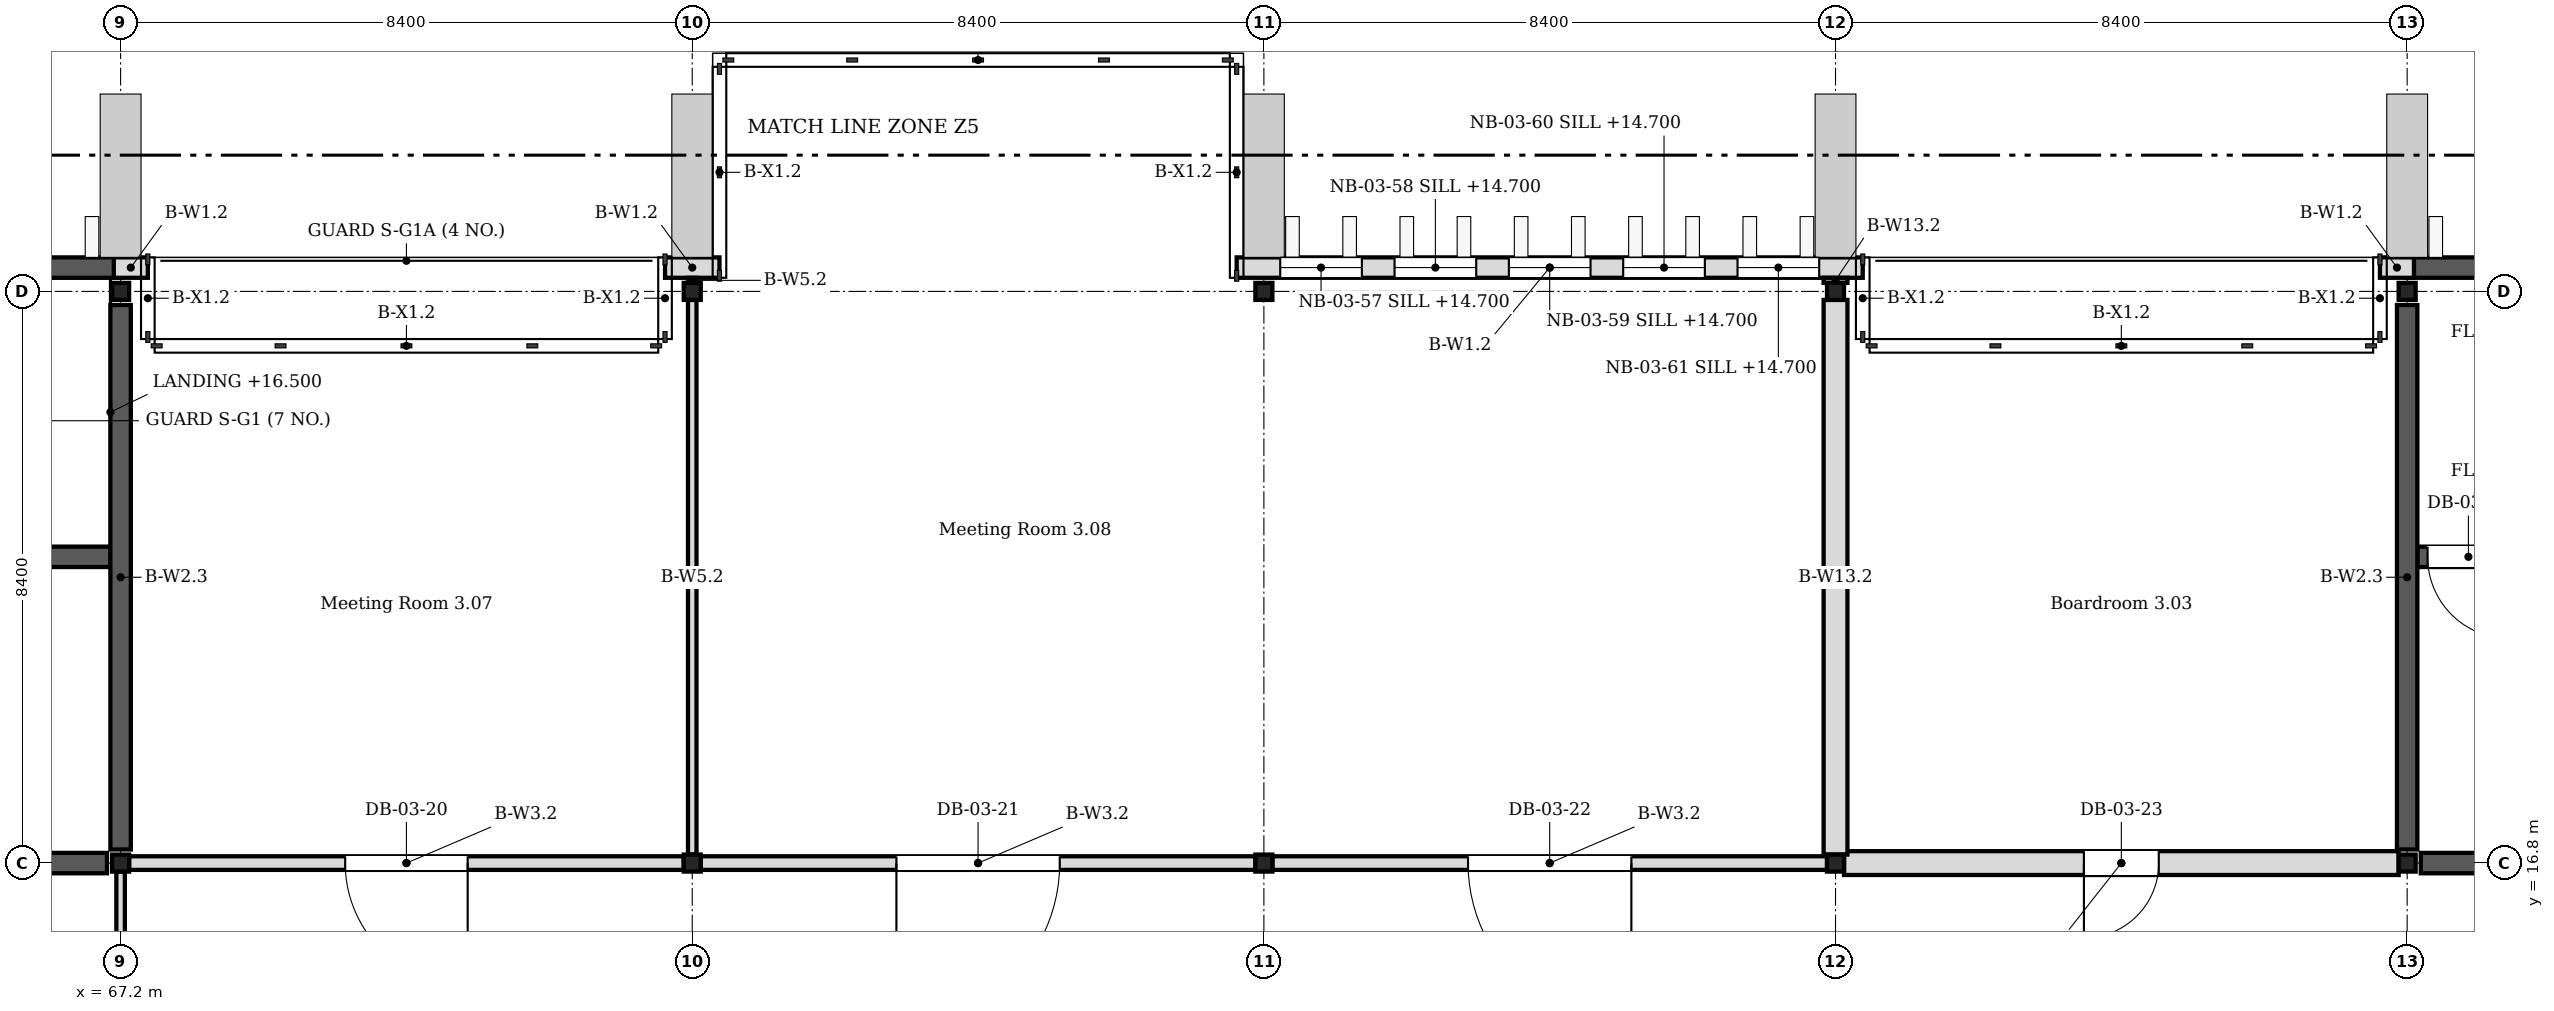
"""IFC4 building model, lengths in metres.
Left out: names, types, materials, properties, quantities, classifications, styles, units other than length and angle.
Written with IfcOpenShell. Run it as: python <this file> out.ifc"""

import sys

from ifc_helpers import new_model, si_unit, direction, frame, frame_2d, origin, origin_2d, place, context, subcontext, project, spatial, rectangle, i_section, extrude, element, fill, save


model = new_model("IFC4")
c1 = context("Model", 3, precision=1e-05, world=origin(), true_north=direction((0.0, 1.0)))
c2 = subcontext(c1, "Body", "Model", "MODEL_VIEW")
j1 = project(units=[si_unit("LENGTHUNIT", "METRE"), si_unit("PLANEANGLEUNIT", "RADIAN")], contexts=[c1])
p1 = place(None, origin())
s1 = spatial("IfcSite", under=j1, at=p1, CompositionType="ELEMENT")
p2 = place(p1, origin())
s2 = spatial("IfcBuilding", under=s1, at=p2, CompositionType="ELEMENT")
p3 = place(p2, frame((0.0, 0.0, 14.4)))
s3 = spatial("IfcBuildingStorey", under=s2, at=p3, CompositionType="ELEMENT", Elevation=14.4)
for number, where, z_axis, x_axis in (
    (1, (67.2, 16.8, 0.0), (0.0, 0.0, 1.0), (1.0, 0.0, 0.0)),
    (2, (67.2, 25.2, 0.0), (0.0, 0.0, 1.0), (1.0, 0.0, 0.0)),
    (3, (75.6, 16.8, 0.0), (0.0, 0.0, 1.0), (1.0, 0.0, 0.0)),
    (4, (75.6, 25.2, 0.0), (0.0, 0.0, 1.0), (1.0, 0.0, 0.0)),
    (5, (84.0, 16.8, 0.0), (0.0, 0.0, 1.0), (1.0, 0.0, 0.0)),
    (6, (84.0, 25.2, 0.0), (0.0, 0.0, 1.0), (1.0, 0.0, 0.0)),
    (7, (92.4, 16.8, 0.0), (0.0, 0.0, 1.0), (1.0, 0.0, 0.0)),
    (8, (92.4, 25.2, 0.0), (0.0, 0.0, 1.0), (1.0, 0.0, 0.0)),
    (9, (100.8, 16.8, 0.0), (0.0, 0.0, 1.0), (1.0, 0.0, 0.0)),
    (10, (100.8, 25.2, 0.0), (0.0, 0.0, 1.0), (1.0, 0.0, 0.0)),
):
    element("IfcColumn", number, at=place(p3, frame(where, z_axis=z_axis, x_axis=x_axis)), inside=s3, PredefinedType="COLUMN", context=c2, shape_type="SweptSolid", body=[
        extrude(i_section(OverallWidth=0.25, OverallDepth=0.25, WebThickness=0.009, FlangeThickness=0.014, FilletRadius=0.013, at=origin_2d()), origin(), (0.0, 0.0, 1.0), 3.95),
    ])
p4 = place(p3, frame((67.2, 17.0, 0.0), z_axis=(0.0, 0.0, 1.0), x_axis=(0.0, 1.0, 0.0)))
e11 = element("IfcWall", 11, at=p4, inside=s3, PredefinedType="SHEAR", context=c2, shape_type="SweptSolid", body=[
    extrude(rectangle(XDim=8.0, YDim=0.3, at=frame_2d((4.0, 0.0))), origin(), (0.0, 0.0, 1.0), 3.95),
])
p5 = place(p3, frame((59.0, 16.8, 0.0), z_axis=(0.0, 0.0, 1.0), x_axis=(1.0, 0.0, 0.0)))
e12 = element("IfcWall", 12, at=p5, inside=s3, PredefinedType="SHEAR", context=c2, shape_type="SweptSolid", body=[
    extrude(rectangle(XDim=8.0, YDim=0.3, at=frame_2d((4.0, 0.0))), origin(), (0.0, 0.0, 1.0), 3.95),
])
p6 = place(p5, frame((3.1, 0.0, 0.0)))
e13 = element("IfcOpeningElement", 13, at=p6, cuts=e12, PredefinedType="OPENING", context=c2, shape_type="SweptSolid", body=[
    extrude(rectangle(XDim=1.8, YDim=2.1, at=frame_2d((0.9, 1.05))), frame((0.0, 0.16, 0.0), z_axis=(0.0, -1.0, 0.0), x_axis=(1.0, 0.0, 0.0)), (0.0, 0.0, 1.0), 0.32),
])
p7 = place(p3, frame((58.95, 21.3, 0.0), z_axis=(0.0, 0.0, 1.0), x_axis=(1.0, 0.0, 0.0)))
e14 = element("IfcWall", 14, at=p7, inside=s3, PredefinedType="SHEAR", context=c2, shape_type="SweptSolid", body=[
    extrude(rectangle(XDim=8.1, YDim=0.3, at=frame_2d((4.05, 0.0))), origin(), (0.0, 0.0, 1.0), 3.95),
])
p8 = place(p7, frame((0.15, 0.0, 0.0)))
e15 = element("IfcOpeningElement", 15, at=p8, cuts=e14, PredefinedType="OPENING", context=c2, shape_type="SweptSolid", body=[
    extrude(rectangle(XDim=1.2, YDim=2.1, at=frame_2d((0.6, 1.05))), frame((0.0, 0.16, 0.0), z_axis=(0.0, -1.0, 0.0), x_axis=(1.0, 0.0, 0.0)), (0.0, 0.0, 1.0), 0.32),
])
p9 = place(p3, frame((58.8, 25.55, 0.0), z_axis=(0.0, 0.0, 1.0), x_axis=(1.0, 0.0, 0.0)))
e16 = element("IfcWall", 16, at=p9, inside=s3, PredefinedType="SHEAR", context=c2, shape_type="SweptSolid", body=[
    extrude(rectangle(XDim=8.4, YDim=0.3, at=frame_2d((4.2, 0.0))), origin(), (0.0, 0.0, 1.0), 3.95),
])
p10 = place(p3, frame((100.8, 17.0, 0.0), z_axis=(0.0, 0.0, 1.0), x_axis=(0.0, 1.0, 0.0)))
e17 = element("IfcWall", 17, at=p10, inside=s3, PredefinedType="SHEAR", context=c2, shape_type="SweptSolid", body=[
    extrude(rectangle(XDim=8.0, YDim=0.3, at=frame_2d((4.0, 0.0))), origin(), (0.0, 0.0, 1.0), 3.95),
])
p11 = place(p3, frame((101.0, 16.8, 0.0), z_axis=(0.0, 0.0, 1.0), x_axis=(1.0, 0.0, 0.0)))
e18 = element("IfcWall", 18, at=p11, inside=s3, PredefinedType="SHEAR", context=c2, shape_type="SweptSolid", body=[
    extrude(rectangle(XDim=8.0, YDim=0.3, at=frame_2d((4.0, 0.0))), origin(), (0.0, 0.0, 1.0), 3.95),
])
p12 = place(p11, frame((3.1, 0.0, 0.0)))
e19 = element("IfcOpeningElement", 19, at=p12, cuts=e18, PredefinedType="OPENING", context=c2, shape_type="SweptSolid", body=[
    extrude(rectangle(XDim=1.8, YDim=2.1, at=frame_2d((0.9, 1.05))), frame((0.0, 0.16, 0.0), z_axis=(0.0, -1.0, 0.0), x_axis=(1.0, 0.0, 0.0)), (0.0, 0.0, 1.0), 0.32),
])
p13 = place(p3, frame((100.95, 21.3, 0.0), z_axis=(0.0, 0.0, 1.0), x_axis=(1.0, 0.0, 0.0)))
e20 = element("IfcWall", 20, at=p13, inside=s3, PredefinedType="SHEAR", context=c2, shape_type="SweptSolid", body=[
    extrude(rectangle(XDim=8.1, YDim=0.3, at=frame_2d((4.05, 0.0))), origin(), (0.0, 0.0, 1.0), 3.95),
])
p14 = place(p13, frame((0.15, 0.0, 0.0)))
e21 = element("IfcOpeningElement", 21, at=p14, cuts=e20, PredefinedType="OPENING", context=c2, shape_type="SweptSolid", body=[
    extrude(rectangle(XDim=1.2, YDim=2.1, at=frame_2d((0.6, 1.05))), frame((0.0, 0.16, 0.0), z_axis=(0.0, -1.0, 0.0), x_axis=(1.0, 0.0, 0.0)), (0.0, 0.0, 1.0), 0.32),
])
p15 = place(p3, frame((100.8, 25.55, 0.0), z_axis=(0.0, 0.0, 1.0), x_axis=(1.0, 0.0, 0.0)))
e22 = element("IfcWall", 22, at=p15, inside=s3, PredefinedType="SHEAR", context=c2, shape_type="SweptSolid", body=[
    extrude(rectangle(XDim=8.4, YDim=0.3, at=frame_2d((4.2, 0.0))), origin(), (0.0, 0.0, 1.0), 3.95),
])
p16 = place(p3, frame((67.1, 25.55, 0.0), z_axis=(0.0, 0.0, 1.0), x_axis=(1.0, 0.0, 0.0)))
e23 = element("IfcWall", 23, at=p16, inside=s3, PredefinedType="SOLIDWALL", context=c2, shape_type="SweptSolid", body=[
    extrude(rectangle(XDim=0.5, YDim=0.3, at=frame_2d((0.25, 0.0))), origin(), (0.0, 0.0, 1.0), 3.95),
])
p17 = place(p3, frame((75.2, 25.55, 0.0), z_axis=(0.0, 0.0, 1.0), x_axis=(1.0, 0.0, 0.0)))
e24 = element("IfcWall", 24, at=p17, inside=s3, PredefinedType="SOLIDWALL", context=c2, shape_type="SweptSolid", body=[
    extrude(rectangle(XDim=0.8, YDim=0.3, at=frame_2d((0.4, 0.0))), origin(), (0.0, 0.0, 1.0), 3.95),
])
p18 = place(p3, frame((83.6, 25.55, 0.0), z_axis=(0.0, 0.0, 1.0), x_axis=(1.0, 0.0, 0.0)))
e25 = element("IfcWall", 25, at=p18, inside=s3, PredefinedType="SOLIDWALL", context=c2, shape_type="SweptSolid", body=[
    extrude(rectangle(XDim=9.2, YDim=0.3, at=frame_2d((4.6, 0.0))), origin(), (0.0, 0.0, 1.0), 3.95),
])
p19 = place(p18, frame((0.64, 0.0, 0.3)))
e26 = element("IfcOpeningElement", 26, at=p19, cuts=e25, PredefinedType="OPENING", context=c2, shape_type="SweptSolid", body=[
    extrude(rectangle(XDim=1.2, YDim=3.3, at=frame_2d((0.6, 1.65))), frame((0.0, 0.16, 0.0), z_axis=(0.0, -1.0, 0.0), x_axis=(1.0, 0.0, 0.0)), (0.0, 0.0, 1.0), 0.32),
])
p20 = place(p18, frame((2.32, 0.0, 0.3)))
e27 = element("IfcOpeningElement", 27, at=p20, cuts=e25, PredefinedType="OPENING", context=c2, shape_type="SweptSolid", body=[
    extrude(rectangle(XDim=1.2, YDim=3.3, at=frame_2d((0.6, 1.65))), frame((0.0, 0.16, 0.0), z_axis=(0.0, -1.0, 0.0), x_axis=(1.0, 0.0, 0.0)), (0.0, 0.0, 1.0), 0.32),
])
p21 = place(p18, frame((4.0, 0.0, 0.3)))
e28 = element("IfcOpeningElement", 28, at=p21, cuts=e25, PredefinedType="OPENING", context=c2, shape_type="SweptSolid", body=[
    extrude(rectangle(XDim=1.2, YDim=3.3, at=frame_2d((0.6, 1.65))), frame((0.0, 0.16, 0.0), z_axis=(0.0, -1.0, 0.0), x_axis=(1.0, 0.0, 0.0)), (0.0, 0.0, 1.0), 0.32),
])
p22 = place(p18, frame((5.68, 0.0, 0.3)))
e29 = element("IfcOpeningElement", 29, at=p22, cuts=e25, PredefinedType="OPENING", context=c2, shape_type="SweptSolid", body=[
    extrude(rectangle(XDim=1.2, YDim=3.3, at=frame_2d((0.6, 1.65))), frame((0.0, 0.16, 0.0), z_axis=(0.0, -1.0, 0.0), x_axis=(1.0, 0.0, 0.0)), (0.0, 0.0, 1.0), 0.32),
])
p23 = place(p18, frame((7.36, 0.0, 0.3)))
e30 = element("IfcOpeningElement", 30, at=p23, cuts=e25, PredefinedType="OPENING", context=c2, shape_type="SweptSolid", body=[
    extrude(rectangle(XDim=1.2, YDim=3.3, at=frame_2d((0.6, 1.65))), frame((0.0, 0.16, 0.0), z_axis=(0.0, -1.0, 0.0), x_axis=(1.0, 0.0, 0.0)), (0.0, 0.0, 1.0), 0.32),
])
p24 = place(p3, frame((100.4, 25.55, 0.0), z_axis=(0.0, 0.0, 1.0), x_axis=(1.0, 0.0, 0.0)))
e31 = element("IfcWall", 31, at=p24, inside=s3, PredefinedType="SOLIDWALL", context=c2, shape_type="SweptSolid", body=[
    extrude(rectangle(XDim=0.5, YDim=0.3, at=frame_2d((0.25, 0.0))), origin(), (0.0, 0.0, 1.0), 3.95),
])
p25 = place(p3, frame((67.325, 16.8, 0.0), z_axis=(0.0, 0.0, 1.0), x_axis=(1.0, 0.0, 0.0)))
e32 = element("IfcWall", 32, at=p25, inside=s3, PredefinedType="PARTITIONING", context=c2, shape_type="SweptSolid", body=[
    extrude(rectangle(XDim=8.15, YDim=0.2, at=frame_2d((4.075, 0.0))), origin(), (0.0, 0.0, 1.0), 3.25),
])
p26 = place(p25, frame((3.175, 0.0, 0.0)))
e33 = element("IfcOpeningElement", 33, at=p26, cuts=e32, PredefinedType="OPENING", context=c2, shape_type="SweptSolid", body=[
    extrude(rectangle(XDim=1.8, YDim=2.1, at=frame_2d((0.9, 1.05))), frame((0.0, 0.11, 0.0), z_axis=(0.0, -1.0, 0.0), x_axis=(1.0, 0.0, 0.0)), (0.0, 0.0, 1.0), 0.22),
])
p27 = place(p3, frame((75.725, 16.8, 0.0), z_axis=(0.0, 0.0, 1.0), x_axis=(1.0, 0.0, 0.0)))
e34 = element("IfcWall", 34, at=p27, inside=s3, PredefinedType="PARTITIONING", context=c2, shape_type="SweptSolid", body=[
    extrude(rectangle(XDim=8.15, YDim=0.2, at=frame_2d((4.075, 0.0))), origin(), (0.0, 0.0, 1.0), 3.25),
])
p28 = place(p27, frame((2.875, 0.0, 0.0)))
e35 = element("IfcOpeningElement", 35, at=p28, cuts=e34, PredefinedType="OPENING", context=c2, shape_type="SweptSolid", body=[
    extrude(rectangle(XDim=2.4, YDim=2.2, at=frame_2d((1.2, 1.1))), frame((0.0, 0.11, 0.0), z_axis=(0.0, -1.0, 0.0), x_axis=(1.0, 0.0, 0.0)), (0.0, 0.0, 1.0), 0.22),
])
p29 = place(p3, frame((84.125, 16.8, 0.0), z_axis=(0.0, 0.0, 1.0), x_axis=(1.0, 0.0, 0.0)))
e36 = element("IfcWall", 36, at=p29, inside=s3, PredefinedType="PARTITIONING", context=c2, shape_type="SweptSolid", body=[
    extrude(rectangle(XDim=8.15, YDim=0.2, at=frame_2d((4.075, 0.0))), origin(), (0.0, 0.0, 1.0), 3.25),
])
p30 = place(p29, frame((2.875, 0.0, 0.0)))
e37 = element("IfcOpeningElement", 37, at=p30, cuts=e36, PredefinedType="OPENING", context=c2, shape_type="SweptSolid", body=[
    extrude(rectangle(XDim=2.4, YDim=2.2, at=frame_2d((1.2, 1.1))), frame((0.0, 0.11, 0.0), z_axis=(0.0, -1.0, 0.0), x_axis=(1.0, 0.0, 0.0)), (0.0, 0.0, 1.0), 0.22),
])
p31 = place(p3, frame((92.525, 16.8, 0.0), z_axis=(0.0, 0.0, 1.0), x_axis=(1.0, 0.0, 0.0)))
e38 = element("IfcWall", 38, at=p31, inside=s3, PredefinedType="PARTITIONING", context=c2, shape_type="SweptSolid", body=[
    extrude(rectangle(XDim=8.15, YDim=0.35, at=frame_2d((4.075, 0.0))), origin(), (0.0, 0.0, 1.0), 3.25),
])
p32 = place(p31, frame((3.525, 0.0, 0.0)))
e39 = element("IfcOpeningElement", 39, at=p32, cuts=e38, PredefinedType="OPENING", context=c2, shape_type="SweptSolid", body=[
    extrude(rectangle(XDim=1.1, YDim=2.4, at=frame_2d((0.55, 1.2))), frame((0.0, 0.185, 0.0), z_axis=(0.0, -1.0, 0.0), x_axis=(1.0, 0.0, 0.0)), (0.0, 0.0, 1.0), 0.37),
])
p33 = place(p3, frame((67.2, 8.525, 0.0), z_axis=(0.0, 0.0, 1.0), x_axis=(0.0, 1.0, 0.0)))
e40 = element("IfcWall", 40, at=p33, inside=s3, PredefinedType="PARTITIONING", context=c2, shape_type="SweptSolid", body=[
    extrude(rectangle(XDim=8.15, YDim=0.125, at=frame_2d((4.075, 0.0))), origin(), (0.0, 0.0, 1.0), 3.25),
])
p34 = place(p33, frame((2.875, 0.0, 0.0)))
e41 = element("IfcOpeningElement", 41, at=p34, cuts=e40, PredefinedType="OPENING", context=c2, shape_type="SweptSolid", body=[
    extrude(rectangle(XDim=2.4, YDim=2.2, at=frame_2d((1.2, 1.1))), frame((0.0, 0.073, 0.0), z_axis=(0.0, -1.0, 0.0), x_axis=(1.0, 0.0, 0.0)), (0.0, 0.0, 1.0), 0.145),
])
p35 = place(p3, frame((75.6, 16.925, 0.0), z_axis=(0.0, 0.0, 1.0), x_axis=(0.0, 1.0, 0.0)))
e42 = element("IfcWall", 42, at=p35, inside=s3, PredefinedType="MOVABLE", context=c2, shape_type="SweptSolid", body=[
    extrude(rectangle(XDim=8.15, YDim=0.125, at=frame_2d((4.075, 0.0))), origin(), (0.0, 0.0, 1.0), 3.25),
])
p36 = place(p3, frame((75.6, 25.325, 0.0), z_axis=(0.0, 0.0, 1.0), x_axis=(0.0, 1.0, 0.0)))
e43 = element("IfcWall", 43, at=p36, inside=s3, PredefinedType="MOVABLE", context=c2, shape_type="SweptSolid", body=[
    extrude(rectangle(XDim=0.075, YDim=0.125, at=frame_2d((0.038, 0.0))), origin(), (0.0, 0.0, 1.0), 3.25),
])
p37 = place(p3, frame((92.4, 16.925, 0.0), z_axis=(0.0, 0.0, 1.0), x_axis=(0.0, 1.0, 0.0)))
e44 = element("IfcWall", 44, at=p37, inside=s3, PredefinedType="PARTITIONING", context=c2, shape_type="SweptSolid", body=[
    extrude(rectangle(XDim=8.15, YDim=0.35, at=frame_2d((4.075, 0.0))), origin(), (0.0, 0.0, 1.0), 3.25),
])
p38 = place(p3, frame((92.4, 25.325, 0.0), z_axis=(0.0, 0.0, 1.0), x_axis=(0.0, 1.0, 0.0)))
e45 = element("IfcWall", 45, at=p38, inside=s3, PredefinedType="PARTITIONING", context=c2, shape_type="SweptSolid", body=[
    extrude(rectangle(XDim=0.075, YDim=0.35, at=frame_2d((0.038, 0.0))), origin(), (0.0, 0.0, 1.0), 3.25),
])
p39 = place(p19, origin())
e46 = element("IfcWindow", 46, at=p39, inside=s3, PartitioningType="TRIPLE_PANEL_VERTICAL", PredefinedType="WINDOW", context=c2, shape_type="SweptSolid", body=[
    extrude(rectangle(XDim=1.2, YDim=3.3, at=frame_2d((0.6, 1.65))), frame((0.0, 0.03, 0.0), z_axis=(0.0, -1.0, 0.0), x_axis=(1.0, 0.0, 0.0)), (0.0, 0.0, 1.0), 0.06),
])
fill(e26, e46)
p40 = place(p20, origin())
e47 = element("IfcWindow", 47, at=p40, inside=s3, PartitioningType="TRIPLE_PANEL_VERTICAL", PredefinedType="WINDOW", context=c2, shape_type="SweptSolid", body=[
    extrude(rectangle(XDim=1.2, YDim=3.3, at=frame_2d((0.6, 1.65))), frame((0.0, 0.03, 0.0), z_axis=(0.0, -1.0, 0.0), x_axis=(1.0, 0.0, 0.0)), (0.0, 0.0, 1.0), 0.06),
])
fill(e27, e47)
p41 = place(p21, origin())
e48 = element("IfcWindow", 48, at=p41, inside=s3, PartitioningType="TRIPLE_PANEL_VERTICAL", PredefinedType="WINDOW", context=c2, shape_type="SweptSolid", body=[
    extrude(rectangle(XDim=1.2, YDim=3.3, at=frame_2d((0.6, 1.65))), frame((0.0, 0.03, 0.0), z_axis=(0.0, -1.0, 0.0), x_axis=(1.0, 0.0, 0.0)), (0.0, 0.0, 1.0), 0.06),
])
fill(e28, e48)
p42 = place(p22, origin())
e49 = element("IfcWindow", 49, at=p42, inside=s3, PartitioningType="TRIPLE_PANEL_VERTICAL", PredefinedType="WINDOW", context=c2, shape_type="SweptSolid", body=[
    extrude(rectangle(XDim=1.2, YDim=3.3, at=frame_2d((0.6, 1.65))), frame((0.0, 0.03, 0.0), z_axis=(0.0, -1.0, 0.0), x_axis=(1.0, 0.0, 0.0)), (0.0, 0.0, 1.0), 0.06),
])
fill(e29, e49)
p43 = place(p23, origin())
e50 = element("IfcWindow", 50, at=p43, inside=s3, PartitioningType="TRIPLE_PANEL_VERTICAL", PredefinedType="WINDOW", context=c2, shape_type="SweptSolid", body=[
    extrude(rectangle(XDim=1.2, YDim=3.3, at=frame_2d((0.6, 1.65))), frame((0.0, 0.03, 0.0), z_axis=(0.0, -1.0, 0.0), x_axis=(1.0, 0.0, 0.0)), (0.0, 0.0, 1.0), 0.06),
])
fill(e30, e50)
p44 = place(p26, origin())
e51 = element("IfcDoor", 51, at=p44, inside=s3, OperationType="DOUBLE_DOOR_SINGLE_SWING", PredefinedType="DOOR", context=c2, shape_type="SweptSolid", body=[
    extrude(rectangle(XDim=1.8, YDim=2.1, at=frame_2d((0.9, 1.05))), frame((0.0, 0.025, 0.0), z_axis=(0.0, -1.0, 0.0), x_axis=(1.0, 0.0, 0.0)), (0.0, 0.0, 1.0), 0.05),
])
fill(e33, e51)
p45 = place(p28, origin())
e52 = element("IfcDoor", 52, at=p45, inside=s3, OperationType="DOUBLE_DOOR_SINGLE_SWING", PredefinedType="DOOR", context=c2, shape_type="SweptSolid", body=[
    extrude(rectangle(XDim=2.4, YDim=2.2, at=frame_2d((1.2, 1.1))), frame((0.0, 0.025, 0.0), z_axis=(0.0, -1.0, 0.0), x_axis=(1.0, 0.0, 0.0)), (0.0, 0.0, 1.0), 0.05),
])
fill(e35, e52)
p46 = place(p30, origin())
e53 = element("IfcDoor", 53, at=p46, inside=s3, OperationType="DOUBLE_DOOR_SINGLE_SWING", PredefinedType="DOOR", context=c2, shape_type="SweptSolid", body=[
    extrude(rectangle(XDim=2.4, YDim=2.2, at=frame_2d((1.2, 1.1))), frame((0.0, 0.025, 0.0), z_axis=(0.0, -1.0, 0.0), x_axis=(1.0, 0.0, 0.0)), (0.0, 0.0, 1.0), 0.05),
])
fill(e37, e53)
p47 = place(p32, origin())
e54 = element("IfcDoor", 54, at=p47, inside=s3, OperationType="SINGLE_SWING_LEFT", PredefinedType="DOOR", context=c2, shape_type="SweptSolid", body=[
    extrude(rectangle(XDim=1.1, YDim=2.4, at=frame_2d((0.55, 1.2))), frame((0.0, 0.025, 0.0), z_axis=(0.0, -1.0, 0.0), x_axis=(1.0, 0.0, 0.0)), (0.0, 0.0, 1.0), 0.05),
])
fill(e39, e54)
p48 = place(p14, origin())
e55 = element("IfcDoor", 55, at=p48, inside=s3, OperationType="SINGLE_SWING_LEFT", PredefinedType="DOOR", context=c2, shape_type="SweptSolid", body=[
    extrude(rectangle(XDim=1.2, YDim=2.1, at=frame_2d((0.6, 1.05))), frame((0.0, 0.025, 0.0), z_axis=(0.0, -1.0, 0.0), x_axis=(1.0, 0.0, 0.0)), (0.0, 0.0, 1.0), 0.05),
])
fill(e21, e55)
save(model, sys.argv[1])
